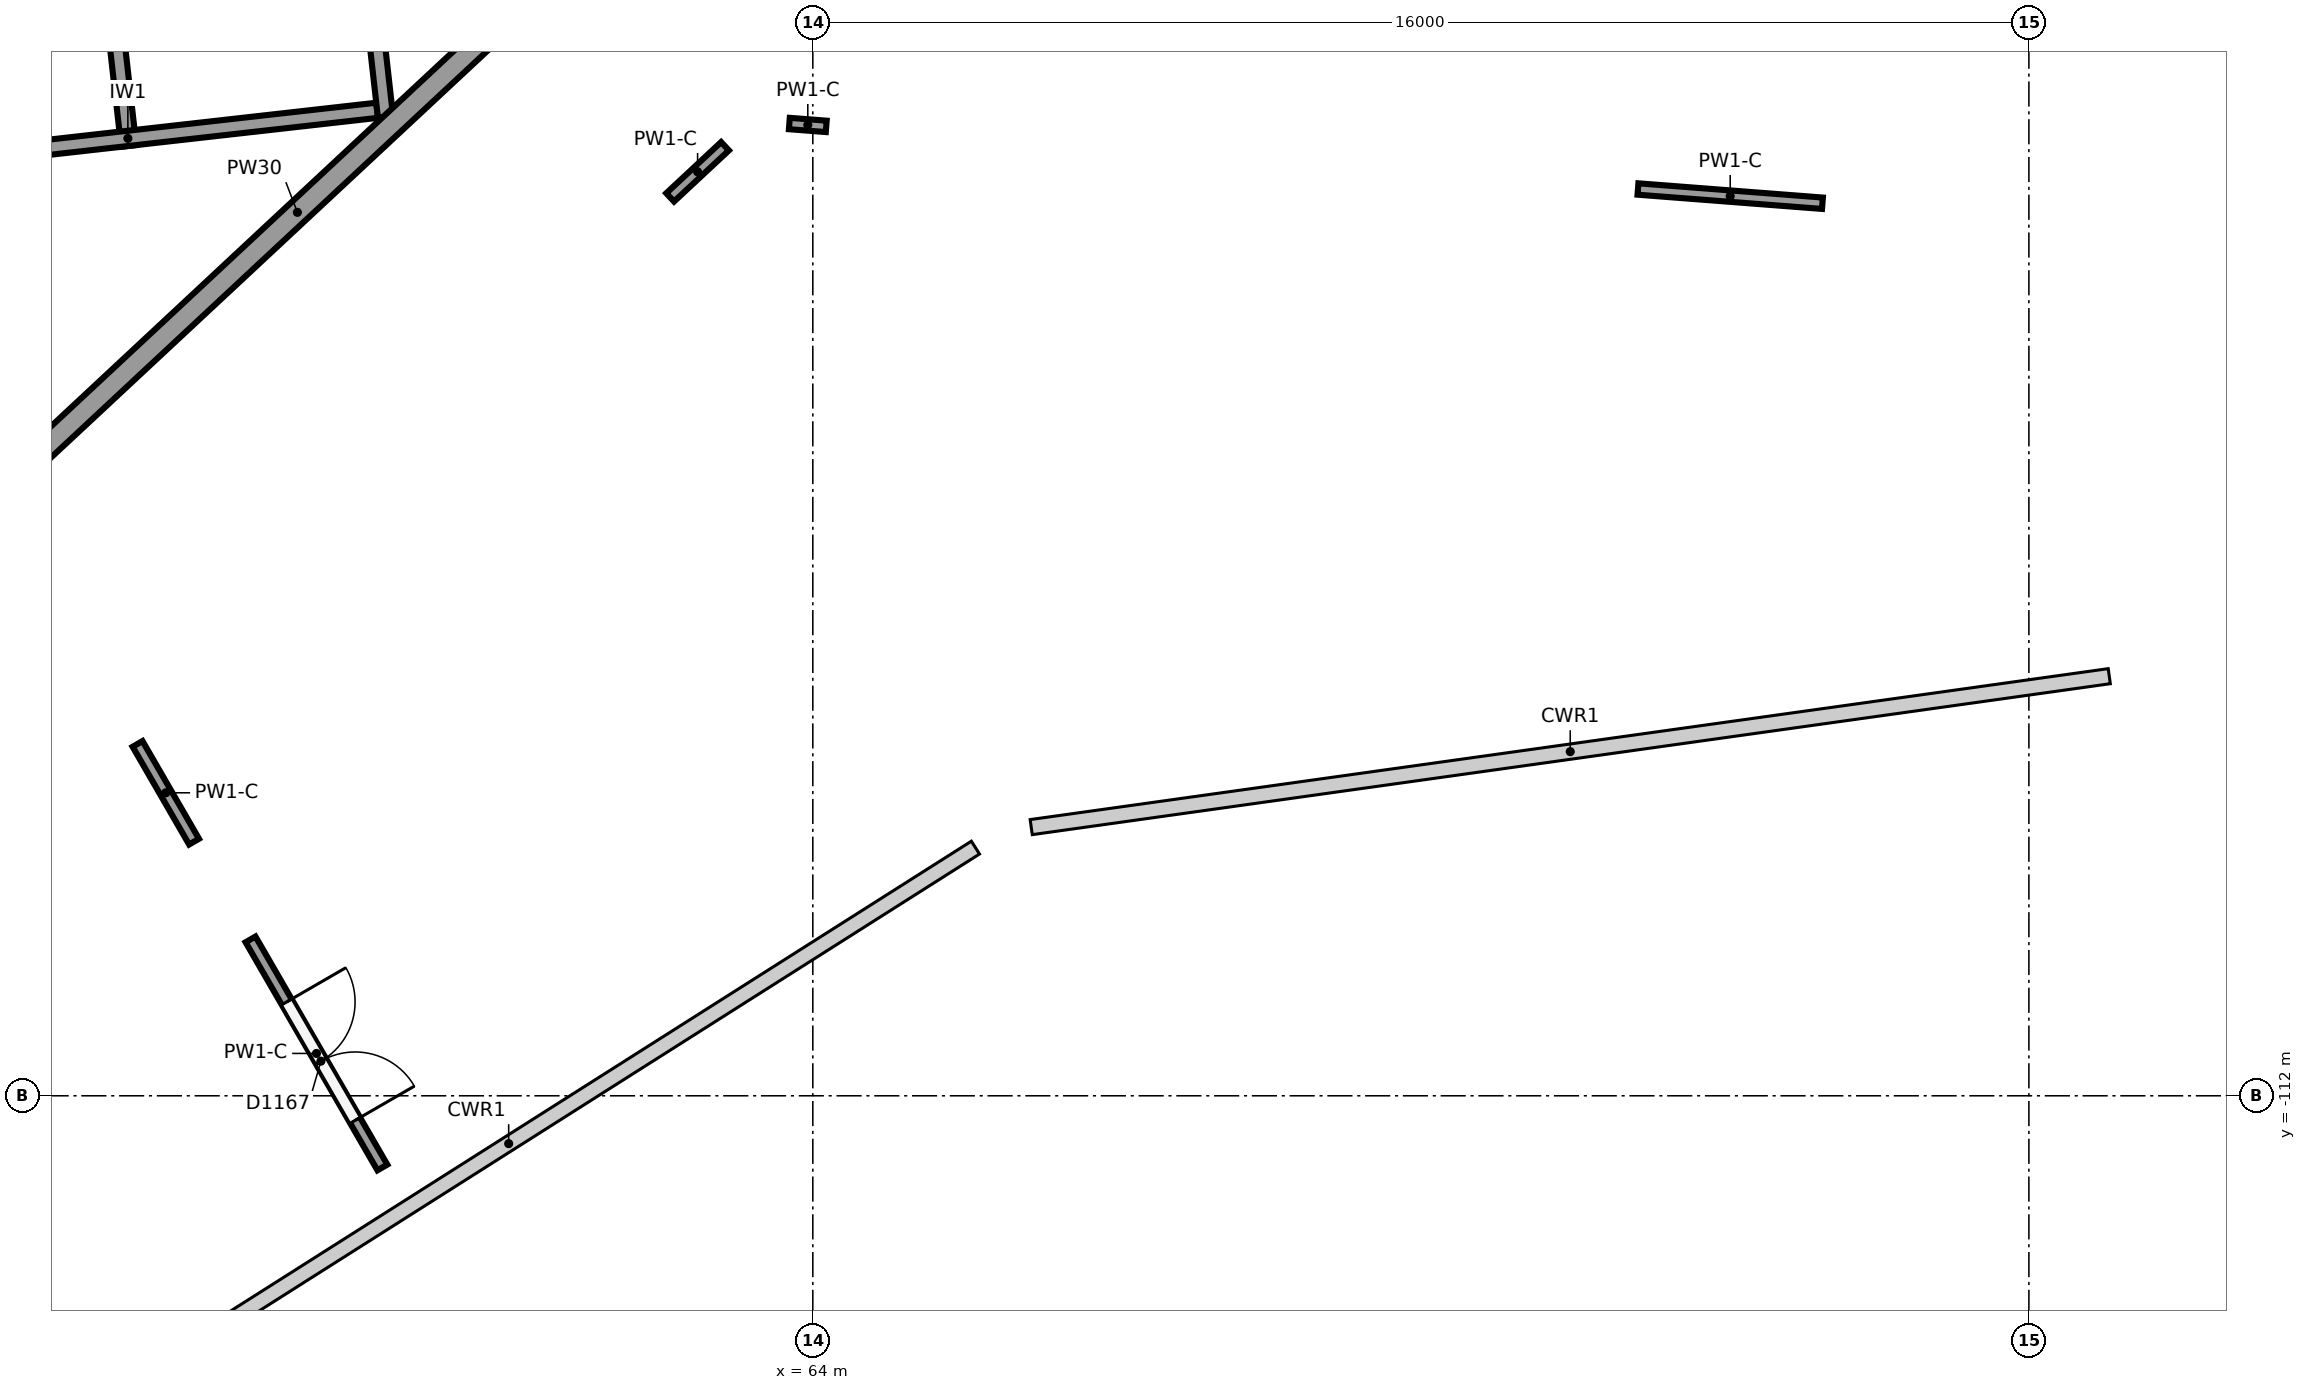
"""IFC4 building model, lengths in metres.
Left out: names, types, materials, properties, quantities, classifications, styles, units other than length and angle.
Written with IfcOpenShell. Run it as: python <this file> out.ifc"""

import sys

from ifc_helpers import new_model, si_unit, direction, frame, frame_2d, origin, origin_2d, place, context, subcontext, project, spatial, rectangle, circle, extrude, element, fill, save


model = new_model("IFC4")
c1 = context("Model", 3, precision=1e-05, world=origin(), true_north=direction((0.0, 1.0)))
c2 = subcontext(c1, "Body", "Model", "MODEL_VIEW")
j1 = project(units=[si_unit("LENGTHUNIT", "METRE"), si_unit("PLANEANGLEUNIT", "RADIAN")], contexts=[c1])
p1 = place(None, origin())
s1 = spatial("IfcSite", under=j1, at=p1, CompositionType="ELEMENT")
p2 = place(p1, origin())
s2 = spatial("IfcBuilding", under=s1, at=p2, CompositionType="ELEMENT")
p3 = place(p2, frame((0.0, 0.0, 12.0)))
s3 = spatial("IfcBuildingStorey", under=s2, at=p3, CompositionType="ELEMENT", Elevation=12.0)
for number, where, z_axis, x_axis in (
    (1, (63.373, -99.648, 0.0), (0.0, 0.0, 1.0), (1.0, 0.0, 0.0)),
    (2, (64.694, -103.424, 0.0), (0.0, 0.0, 1.0), (1.0, 0.0, 0.0)),
    (3, (66.477, -108.521, 0.0), (0.0, 0.0, 1.0), (1.0, 0.0, 0.0)),
    (4, (77.187, -99.634, 0.0), (0.0, 0.0, 1.0), (1.0, 0.0, 0.0)),
    (5, (78.581, -101.852, 0.0), (0.0, 0.0, 1.0), (1.0, 0.0, 0.0)),
    (6, (81.454, -106.424, 0.0), (0.0, 0.0, 1.0), (1.0, 0.0, 0.0)),
):
    element("IfcColumn", number, at=place(p3, frame(where, z_axis=z_axis, x_axis=x_axis)), inside=s3, PredefinedType="COLUMN", context=c2, shape_type="SweptSolid", body=[
        extrude(circle(Radius=0.4, at=origin_2d()), origin(), (0.0, 0.0, 1.0), 6.0),
    ])
p4 = place(p3, frame((61.723, -96.179, 0.0), z_axis=(0.0, 0.0, 1.0), x_axis=(-0.731540985517, -0.681797467368, 0.0)))
e7 = element("IfcWall", 7, at=p4, inside=s3, PredefinedType="SOLIDWALL", context=c2, shape_type="SweptSolid", body=[
    extrude(rectangle(XDim=12.314, YDim=0.3, at=frame_2d((6.157, 0.0))), origin(), (0.0, 0.0, 1.0), 4.35),
])
p5 = place(p3, frame((58.378, -99.123, 0.0), z_axis=(0.0, 0.0, 1.0), x_axis=(-0.111982724367, 0.993710153638, 0.0)))
e8 = element("IfcWall", 8, at=p5, inside=s3, PredefinedType="SHEAR", context=c2, shape_type="SweptSolid", body=[
    extrude(rectangle(XDim=7.6, YDim=0.2, at=frame_2d((3.8, 0.0))), origin(), (0.0, 0.0, 1.0), 5.65),
])
p6 = place(p3, frame((51.709, -99.774, 0.0), z_axis=(0.0, 0.0, 1.0), x_axis=(0.993715690617, 0.111933579504, 0.0)))
e9 = element("IfcWall", 9, at=p6, inside=s3, PredefinedType="SHEAR", context=c2, shape_type="SweptSolid", body=[
    extrude(rectangle(XDim=6.6, YDim=0.2, at=frame_2d((3.3, 0.0))), origin(), (0.0, 0.0, 1.0), 5.65),
])
p7 = place(p3, frame((54.999, -99.504, 0.0), z_axis=(0.0, 0.0, 1.0), x_axis=(-0.111982724367, 0.993710153638, 0.0)))
e10 = element("IfcWall", 10, at=p7, inside=s3, PredefinedType="SHEAR", context=c2, shape_type="SweptSolid", body=[
    extrude(rectangle(XDim=7.6, YDim=0.2, at=frame_2d((3.8, 0.0))), origin(), (0.0, 0.0, 1.0), 5.65),
])
p8 = place(p3, frame((55.115, -107.371, 0.0), z_axis=(0.0, 0.0, 1.0), x_axis=(0.500504874148, -0.865733718272, 0.0)))
e11 = element("IfcWall", 11, at=p8, inside=s3, PredefinedType="PARTITIONING", context=c2, shape_type="SweptSolid", body=[
    extrude(rectangle(XDim=1.485, YDim=0.15, at=frame_2d((0.743, 0.0))), origin(), (0.0, 0.0, 1.0), 5.55),
])
p9 = place(p3, frame((56.602, -109.943, 0.0), z_axis=(0.0, 0.0, 1.0), x_axis=(0.500389094417, -0.865800643444, 0.0)))
e12 = element("IfcWall", 12, at=p9, inside=s3, PredefinedType="PARTITIONING", context=c2, shape_type="SweptSolid", body=[
    extrude(rectangle(XDim=3.466, YDim=0.15, at=frame_2d((1.733, 0.0))), origin(), (0.0, 0.0, 1.0), 5.55),
])
p10 = place(p9, frame((0.95, 0.0, 0.0)))
e13 = element("IfcOpeningElement", 13, at=p10, cuts=e12, PredefinedType="OPENING", context=c2, shape_type="SweptSolid", body=[
    extrude(rectangle(XDim=1.8, YDim=2.1, at=frame_2d((0.9, 1.05))), frame((0.0, 0.085, 0.0), z_axis=(0.0, -1.0, 0.0), x_axis=(1.0, 0.0, 0.0)), (0.0, 0.0, 1.0), 0.17),
])
p11 = place(p3, frame((62.123, -100.18, 0.0), z_axis=(0.0, 0.0, 1.0), x_axis=(0.731655638736, 0.681674428379, 0.0)))
e14 = element("IfcWall", 14, at=p11, inside=s3, PredefinedType="PARTITIONING", context=c2, shape_type="SweptSolid", body=[
    extrude(rectangle(XDim=0.987, YDim=0.15, at=frame_2d((0.493, 0.0))), origin(), (0.0, 0.0, 1.0), 5.55),
])
p12 = place(p3, frame((63.691, -99.209, 0.0), z_axis=(0.0, 0.0, 1.0), x_axis=(0.997054485502, -0.076696498885, 0.0)))
e15 = element("IfcWall", 15, at=p12, inside=s3, PredefinedType="PARTITIONING", context=c2, shape_type="SweptSolid", body=[
    extrude(rectangle(XDim=0.487, YDim=0.15, at=frame_2d((0.244, 0.0))), origin(), (0.0, 0.0, 1.0), 5.55),
])
p13 = place(p3, frame((74.856, -100.07, 0.0), z_axis=(0.0, 0.0, 1.0), x_axis=(0.99703735319, -0.076918894578, 0.0)))
e16 = element("IfcWall", 16, at=p13, inside=s3, PredefinedType="PARTITIONING", context=c2, shape_type="SweptSolid", body=[
    extrude(rectangle(XDim=2.435, YDim=0.15, at=frame_2d((1.217, 0.0))), origin(), (0.0, 0.0, 1.0), 5.55),
])
p14 = place(p10, origin())
e17 = element("IfcDoor", 17, at=p14, inside=s3, OperationType="DOUBLE_DOOR_SINGLE_SWING", PredefinedType="DOOR", context=c2, shape_type="SweptSolid", body=[
    extrude(rectangle(XDim=1.8, YDim=2.1, at=frame_2d((0.9, 1.05))), frame((0.0, 0.025, 0.0), z_axis=(0.0, -1.0, 0.0), x_axis=(1.0, 0.0, 0.0)), (0.0, 0.0, 1.0), 0.05),
])
fill(e13, e17)
save(model, sys.argv[1])
